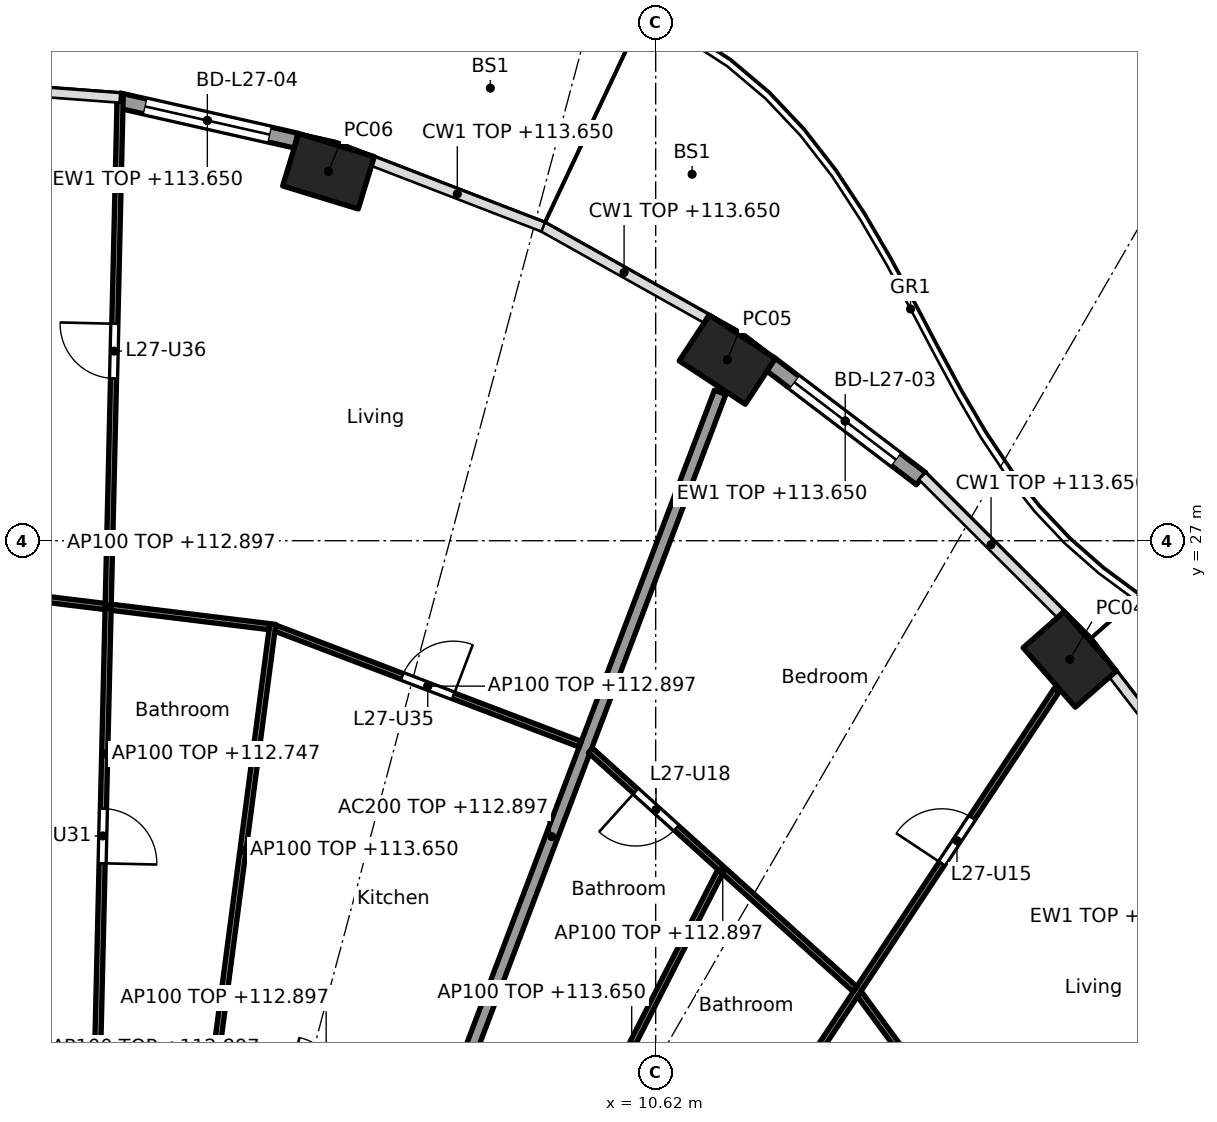
"""IFC4 building model, lengths in metres.
Left out: names, types, materials, properties, quantities, classifications, styles, units other than length and angle.
Written with IfcOpenShell. Run it as: python <this file> out.ifc"""

import sys

from ifc_helpers import new_model, si_unit, direction, frame, frame_2d, origin, origin_2d, place, context, subcontext, project, spatial, rectangle, hollow_rectangle, extrude, element, fill, save


model = new_model("IFC4")
c1 = context("Model", 3, precision=1e-05, world=origin(), true_north=direction((0.0, 1.0)))
c2 = subcontext(c1, "Body", "Model", "MODEL_VIEW")
j1 = project(units=[si_unit("LENGTHUNIT", "METRE"), si_unit("PLANEANGLEUNIT", "RADIAN")], contexts=[c1])
p1 = place(None, origin())
s1 = spatial("IfcSite", under=j1, at=p1, CompositionType="ELEMENT")
p2 = place(p1, origin())
s2 = spatial("IfcBuilding", under=s1, at=p2, CompositionType="ELEMENT")
p3 = place(p2, frame((0.0, 0.0, 110.3)))
s3 = spatial("IfcBuildingStorey", under=s2, at=p3, CompositionType="ELEMENT", Elevation=110.3)
for number, where, z_axis, x_axis in (
    (1, (17.43, 25.049, 0.0), (0.0, 0.0, 1.0), (-0.66, 0.751, 0.0)),
    (2, (11.798, 29.978, 0.0), (0.0, 0.0, 1.0), (-0.836, 0.549, 0.0)),
    (3, (5.239, 33.076, 0.0), (0.0, 0.0, 1.0), (-0.957, 0.292, 0.0)),
):
    element("IfcColumn", number, at=place(p3, frame(where, z_axis=z_axis, x_axis=x_axis)), inside=s3, PredefinedType="COLUMN", context=c2, shape_type="SweptSolid", body=[
        extrude(hollow_rectangle(XDim=1.3, YDim=0.9, WallThickness=0.045, at=origin_2d()), origin(), (0.0, 0.0, 1.0), 3.7),
    ])
p4 = place(p3, frame((12.489, 29.917, 0.0), z_axis=(0.0, 0.0, 1.0), x_axis=(0.796037575978, -0.605247203736, 0.0)))
e4 = element("IfcWall", 4, at=p4, inside=s3, PredefinedType="SOLIDWALL", context=c2, shape_type="SweptSolid", body=[
    extrude(rectangle(XDim=3.134, YDim=0.25, at=frame_2d((1.567, 0.0))), origin(), (0.0, 0.0, 1.0), 3.35),
])
p5 = place(p4, frame((0.517, 0.0, 0.0)))
e5 = element("IfcOpeningElement", 5, at=p5, cuts=e4, PredefinedType="OPENING", context=c2, shape_type="SweptSolid", body=[
    extrude(rectangle(XDim=2.1, YDim=2.4, at=frame_2d((1.05, 1.2))), frame((0.0, 0.135, 0.0), z_axis=(0.0, -1.0, 0.0), x_axis=(1.0, 0.0, 0.0)), (0.0, 0.0, 1.0), 0.27),
])
p6 = place(p3, frame((1.787, 34.241, 0.0), z_axis=(0.0, 0.0, 1.0), x_axis=(0.975317607872, -0.220806620767, 0.0)))
e6 = element("IfcWall", 6, at=p6, inside=s3, PredefinedType="SOLIDWALL", context=c2, shape_type="SweptSolid", body=[
    extrude(rectangle(XDim=2.993, YDim=0.25, at=frame_2d((1.497, 0.0))), origin(), (0.0, 0.0, 1.0), 3.35),
])
p7 = place(p6, frame((0.447, 0.0, 0.0)))
e7 = element("IfcOpeningElement", 7, at=p7, cuts=e6, PredefinedType="OPENING", context=c2, shape_type="SweptSolid", body=[
    extrude(rectangle(XDim=2.1, YDim=2.4, at=frame_2d((1.05, 1.2))), frame((0.0, 0.135, 0.0), z_axis=(0.0, -1.0, 0.0), x_axis=(1.0, 0.0, 0.0)), (0.0, 0.0, 1.0), 0.27),
])
p8 = place(p3, frame((6.141, 14.829, 0.0), z_axis=(0.0, 0.0, 1.0), x_axis=(0.354477134193, 0.935064682968, 0.0)))
e8 = element("IfcWall", 8, at=p8, inside=s3, PredefinedType="PARTITIONING", context=c2, shape_type="SweptSolid", body=[
    extrude(rectangle(XDim=15.626, YDim=0.2, at=frame_2d((7.813, 0.0))), origin(), (0.0, 0.0, 1.0), 2.597),
])
p9 = place(p3, frame((17.567, 14.653, 0.0), z_axis=(0.0, 0.0, 1.0), x_axis=(-0.592391983588, 0.80564988536, 0.0)))
e9 = element("IfcWall", 9, at=p9, inside=s3, PredefinedType="PARTITIONING", context=c2, shape_type="SweptSolid", body=[
    extrude(rectangle(XDim=6.08, YDim=0.1, at=frame_2d((3.04, 0.0))), origin(), (0.0, 0.0, 1.0), 2.597),
])
p10 = place(p9, frame((2.59, 0.0, 0.0)))
e10 = element("IfcOpeningElement", 10, at=p10, cuts=e9, PredefinedType="OPENING", context=c2, shape_type="SweptSolid", body=[
    extrude(rectangle(XDim=0.9, YDim=2.1, at=frame_2d((0.45, 1.05))), frame((0.0, 0.06, 0.0), z_axis=(0.0, -1.0, 0.0), x_axis=(1.0, 0.0, 0.0)), (0.0, 0.0, 1.0), 0.12),
])
p11 = place(p3, frame((7.713, 10.195, 0.0), z_axis=(0.0, 0.0, 1.0), x_axis=(0.552111071171, 0.833770571015, 0.0)))
e11 = element("IfcWall", 11, at=p11, inside=s3, PredefinedType="PARTITIONING", context=c2, shape_type="SweptSolid", body=[
    extrude(rectangle(XDim=17.208, YDim=0.1, at=frame_2d((8.604, 0.0))), origin(), (0.0, 0.0, 1.0), 2.447),
])
p12 = place(p11, frame((1.976, 0.0, 0.0)))
e12 = element("IfcOpeningElement", 12, at=p12, cuts=e11, PredefinedType="OPENING", context=c2, shape_type="SweptSolid", body=[
    extrude(rectangle(XDim=0.9, YDim=2.1, at=frame_2d((0.45, 1.05))), frame((0.0, 0.06, 0.0), z_axis=(0.0, -1.0, 0.0), x_axis=(1.0, 0.0, 0.0)), (0.0, 0.0, 1.0), 0.12),
])
p13 = place(p11, frame((7.611, 0.0, 0.0)))
e13 = element("IfcOpeningElement", 13, at=p13, cuts=e11, PredefinedType="OPENING", context=c2, shape_type="SweptSolid", body=[
    extrude(rectangle(XDim=0.9, YDim=2.1, at=frame_2d((0.45, 1.05))), frame((0.0, 0.06, 0.0), z_axis=(0.0, -1.0, 0.0), x_axis=(1.0, 0.0, 0.0)), (0.0, 0.0, 1.0), 0.12),
])
p14 = place(p11, frame((13.79, 0.0, 0.0)))
e14 = element("IfcOpeningElement", 14, at=p14, cuts=e11, PredefinedType="OPENING", context=c2, shape_type="SweptSolid", body=[
    extrude(rectangle(XDim=0.9, YDim=2.1, at=frame_2d((0.45, 1.05))), frame((0.0, 0.06, 0.0), z_axis=(0.0, -1.0, 0.0), x_axis=(1.0, 0.0, 0.0)), (0.0, 0.0, 1.0), 0.12),
])
p15 = place(p3, frame((13.898, 19.625, 0.0), z_axis=(0.0, 0.0, 1.0), x_axis=(-0.742396654702, 0.669960601146, 0.0)))
e15 = element("IfcWall", 15, at=p15, inside=s3, PredefinedType="PARTITIONING", context=c2, shape_type="SweptSolid", body=[
    extrude(rectangle(XDim=5.861, YDim=0.1, at=frame_2d((2.931, 0.0))), origin(), (0.0, 0.0, 1.0), 2.597),
])
p16 = place(p15, frame((3.958, 0.0, 0.0)))
e16 = element("IfcOpeningElement", 16, at=p16, cuts=e15, PredefinedType="OPENING", context=c2, shape_type="SweptSolid", body=[
    extrude(rectangle(XDim=0.9, YDim=2.1, at=frame_2d((0.45, 1.05))), frame((0.0, 0.06, 0.0), z_axis=(0.0, -1.0, 0.0), x_axis=(1.0, 0.0, 0.0)), (0.0, 0.0, 1.0), 0.12),
])
p17 = place(p3, frame((8.769, 15.846, 0.0), z_axis=(0.0, 0.0, 1.0), x_axis=(0.454067187552, 0.890967445639, 0.0)))
e17 = element("IfcWall", 17, at=p17, inside=s3, PredefinedType="PARTITIONING", context=c2, shape_type="SweptSolid", body=[
    extrude(rectangle(XDim=6.414, YDim=0.1, at=frame_2d((3.207, 0.0))), origin(), (0.0, 0.0, 1.0), 3.35),
])
p18 = place(p3, frame((9.379, 23.655, 0.0), z_axis=(0.0, 0.0, 1.0), x_axis=(-0.934613076136, 0.355666132653, 0.0)))
e18 = element("IfcWall", 18, at=p18, inside=s3, PredefinedType="PARTITIONING", context=c2, shape_type="SweptSolid", body=[
    extrude(rectangle(XDim=5.366, YDim=0.1, at=frame_2d((2.683, 0.0))), origin(), (0.0, 0.0, 1.0), 2.597),
])
p19 = place(p18, frame((2.233, 0.0, 0.0)))
e19 = element("IfcOpeningElement", 19, at=p19, cuts=e18, PredefinedType="OPENING", context=c2, shape_type="SweptSolid", body=[
    extrude(rectangle(XDim=0.9, YDim=2.1, at=frame_2d((0.45, 1.05))), frame((0.0, 0.06, 0.0), z_axis=(0.0, -1.0, 0.0), x_axis=(1.0, 0.0, 0.0)), (0.0, 0.0, 1.0), 0.12),
])
p20 = place(p3, frame((3.343, 18.184, 0.0), z_axis=(0.0, 0.0, 1.0), x_axis=(0.130596603503, 0.991435589009, 0.0)))
e20 = element("IfcWall", 20, at=p20, inside=s3, PredefinedType="PARTITIONING", context=c2, shape_type="SweptSolid", body=[
    extrude(rectangle(XDim=7.511, YDim=0.1, at=frame_2d((3.756, 0.0))), origin(), (0.0, 0.0, 1.0), 3.35),
])
p21 = place(p3, frame((4.267, 25.587, 0.0), z_axis=(0.0, 0.0, 1.0), x_axis=(-0.992576206119, 0.121624319302, 0.0)))
e21 = element("IfcWall", 21, at=p21, inside=s3, PredefinedType="PARTITIONING", context=c2, shape_type="SweptSolid", body=[
    extrude(rectangle(XDim=5.374, YDim=0.1, at=frame_2d((2.687, 0.0))), origin(), (0.0, 0.0, 1.0), 2.597),
])
p22 = place(p3, frame((1.303, 12.665, 0.0), z_axis=(0.0, 0.0, 1.0), x_axis=(0.023564110689, 0.999722327793, 0.0)))
e22 = element("IfcWall", 22, at=p22, inside=s3, PredefinedType="PARTITIONING", context=c2, shape_type="SweptSolid", body=[
    extrude(rectangle(XDim=21.664, YDim=0.1, at=frame_2d((10.832, 0.0))), origin(), (0.0, 0.0, 1.0), 2.447),
])
p23 = place(p22, frame((2.407, 0.0, 0.0)))
e23 = element("IfcOpeningElement", 23, at=p23, cuts=e22, PredefinedType="OPENING", context=c2, shape_type="SweptSolid", body=[
    extrude(rectangle(XDim=0.9, YDim=2.1, at=frame_2d((0.45, 1.05))), frame((0.0, 0.06, 0.0), z_axis=(0.0, -1.0, 0.0), x_axis=(1.0, 0.0, 0.0)), (0.0, 0.0, 1.0), 0.12),
])
p24 = place(p22, frame((9.034, 0.0, 0.0)))
e24 = element("IfcOpeningElement", 24, at=p24, cuts=e22, PredefinedType="OPENING", context=c2, shape_type="SweptSolid", body=[
    extrude(rectangle(XDim=0.9, YDim=2.1, at=frame_2d((0.45, 1.05))), frame((0.0, 0.06, 0.0), z_axis=(0.0, -1.0, 0.0), x_axis=(1.0, 0.0, 0.0)), (0.0, 0.0, 1.0), 0.12),
])
p25 = place(p22, frame((17.009, 0.0, 0.0)))
e25 = element("IfcOpeningElement", 25, at=p25, cuts=e22, PredefinedType="OPENING", context=c2, shape_type="SweptSolid", body=[
    extrude(rectangle(XDim=0.9, YDim=2.1, at=frame_2d((0.45, 1.05))), frame((0.0, 0.06, 0.0), z_axis=(0.0, -1.0, 0.0), x_axis=(1.0, 0.0, 0.0)), (0.0, 0.0, 1.0), 0.12),
])
p26 = place(p5, origin())
e26 = element("IfcDoor", 26, at=p26, inside=s3, OperationType="SLIDING_TO_LEFT", PredefinedType="DOOR", context=c2, shape_type="SweptSolid", body=[
    extrude(rectangle(XDim=2.1, YDim=2.4, at=frame_2d((1.05, 1.2))), frame((0.0, 0.025, 0.0), z_axis=(0.0, -1.0, 0.0), x_axis=(1.0, 0.0, 0.0)), (0.0, 0.0, 1.0), 0.05),
])
fill(e5, e26)
p27 = place(p7, origin())
e27 = element("IfcDoor", 27, at=p27, inside=s3, OperationType="SLIDING_TO_LEFT", PredefinedType="DOOR", context=c2, shape_type="SweptSolid", body=[
    extrude(rectangle(XDim=2.1, YDim=2.4, at=frame_2d((1.05, 1.2))), frame((0.0, 0.025, 0.0), z_axis=(0.0, -1.0, 0.0), x_axis=(1.0, 0.0, 0.0)), (0.0, 0.0, 1.0), 0.05),
])
fill(e7, e27)
p28 = place(p14, origin())
e28 = element("IfcDoor", 28, at=p28, inside=s3, OperationType="SINGLE_SWING_LEFT", PredefinedType="DOOR", context=c2, shape_type="SweptSolid", body=[
    extrude(rectangle(XDim=0.9, YDim=2.1, at=frame_2d((0.45, 1.05))), frame((0.0, 0.025, 0.0), z_axis=(0.0, -1.0, 0.0), x_axis=(1.0, 0.0, 0.0)), (0.0, 0.0, 1.0), 0.05),
])
fill(e14, e28)
p29 = place(p16, origin())
e29 = element("IfcDoor", 29, at=p29, inside=s3, OperationType="SINGLE_SWING_RIGHT", PredefinedType="DOOR", context=c2, shape_type="SweptSolid", body=[
    extrude(rectangle(XDim=0.9, YDim=2.1, at=frame_2d((0.45, 1.05))), frame((0.0, 0.025, 0.0), z_axis=(0.0, -1.0, 0.0), x_axis=(1.0, 0.0, 0.0)), (0.0, 0.0, 1.0), 0.05),
])
fill(e16, e29)
p30 = place(p24, frame((0.9, 0.0, 0.0), x_axis=(-1.0, 0.0, 0.0)))
e30 = element("IfcDoor", 30, at=p30, inside=s3, OperationType="SINGLE_SWING_RIGHT", PredefinedType="DOOR", context=c2, shape_type="SweptSolid", body=[
    extrude(rectangle(XDim=0.9, YDim=2.1, at=frame_2d((0.45, 1.05))), frame((0.0, 0.025, 0.0), z_axis=(0.0, -1.0, 0.0), x_axis=(1.0, 0.0, 0.0)), (0.0, 0.0, 1.0), 0.05),
])
fill(e24, e30)
p31 = place(p19, frame((0.9, 0.0, 0.0), x_axis=(-1.0, 0.0, 0.0)))
e31 = element("IfcDoor", 31, at=p31, inside=s3, OperationType="SINGLE_SWING_RIGHT", PredefinedType="DOOR", context=c2, shape_type="SweptSolid", body=[
    extrude(rectangle(XDim=0.9, YDim=2.1, at=frame_2d((0.45, 1.05))), frame((0.0, 0.025, 0.0), z_axis=(0.0, -1.0, 0.0), x_axis=(1.0, 0.0, 0.0)), (0.0, 0.0, 1.0), 0.05),
])
fill(e19, e31)
p32 = place(p25, origin())
e32 = element("IfcDoor", 32, at=p32, inside=s3, OperationType="SINGLE_SWING_RIGHT", PredefinedType="DOOR", context=c2, shape_type="SweptSolid", body=[
    extrude(rectangle(XDim=0.9, YDim=2.1, at=frame_2d((0.45, 1.05))), frame((0.0, 0.025, 0.0), z_axis=(0.0, -1.0, 0.0), x_axis=(1.0, 0.0, 0.0)), (0.0, 0.0, 1.0), 0.05),
])
fill(e25, e32)
save(model, sys.argv[1])
